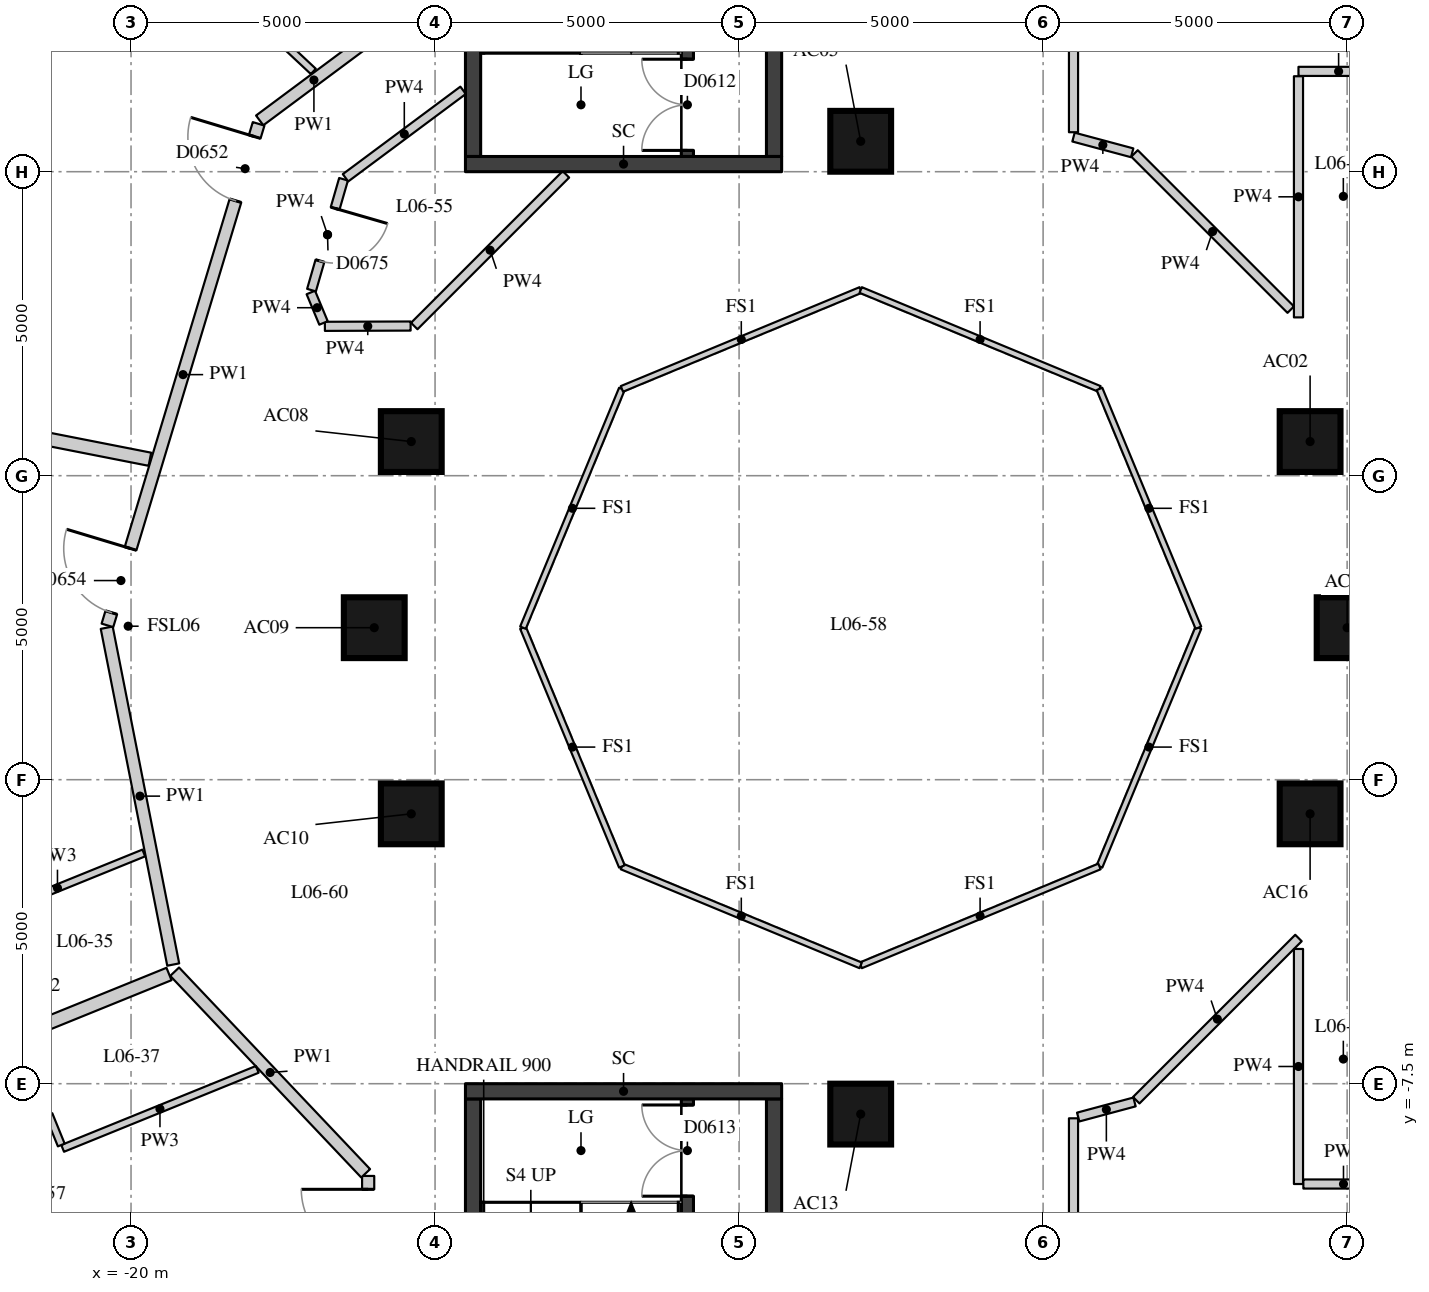
"""IFC4 building model, lengths in metres.
Left out: names, types, materials, properties, quantities, classifications, styles, units other than length and angle.
Written with IfcOpenShell. Run it as: python <this file> out.ifc"""

import sys

from ifc_helpers import new_model, si_unit, direction, frame, frame_2d, origin, origin_2d, place, context, subcontext, project, spatial, rectangle, extrude, element, fill, save


model = new_model("IFC4")
c1 = context("Model", 3, precision=1e-05, world=origin(), true_north=direction((0.0, 1.0)))
c2 = subcontext(c1, "Body", "Model", "MODEL_VIEW")
j1 = project(units=[si_unit("LENGTHUNIT", "METRE"), si_unit("PLANEANGLEUNIT", "RADIAN")], contexts=[c1])
p1 = place(None, origin())
s1 = spatial("IfcSite", under=j1, at=p1, CompositionType="ELEMENT")
p2 = place(p1, origin())
s2 = spatial("IfcBuilding", under=s1, at=p2, CompositionType="ELEMENT")
p3 = place(p2, frame((0.0, 0.0, 28.3)))
s3 = spatial("IfcBuildingStorey", under=s2, at=p3, CompositionType="ELEMENT", Elevation=28.3)
for number, where, z_axis, x_axis in (
    (1, (0.0, 0.0, 0.0), (0.0, 0.0, 1.0), (1.0, 0.0, 0.0)),
    (2, (-0.609, 3.062, 0.0), (0.0, 0.0, 1.0), (1.0, 0.0, 0.0)),
    (3, (-8.0, 8.0, 0.0), (0.0, 0.0, 1.0), (1.0, 0.0, 0.0)),
    (4, (-15.391, 3.062, 0.0), (0.0, 0.0, 1.0), (1.0, 0.0, 0.0)),
    (5, (-16.0, 0.0, 0.0), (0.0, 0.0, 1.0), (1.0, 0.0, 0.0)),
    (6, (-15.391, -3.062, 0.0), (0.0, 0.0, 1.0), (1.0, 0.0, 0.0)),
    (7, (-8.0, -8.0, 0.0), (0.0, 0.0, 1.0), (1.0, 0.0, 0.0)),
    (8, (-0.609, -3.062, 0.0), (0.0, 0.0, 1.0), (1.0, 0.0, 0.0)),
):
    element("IfcColumn", number, at=place(p3, frame(where, z_axis=z_axis, x_axis=x_axis)), inside=s3, PredefinedType="COLUMN", context=c2, shape_type="SweptSolid", body=[
        extrude(rectangle(XDim=1.0, YDim=1.0, at=origin_2d()), origin(), (0.0, 0.0, 1.0), 3.3),
    ])
p4 = place(p3, frame((-10.85, 7.75, 0.0), z_axis=(0.0, 0.0, 1.0), x_axis=(0.0, 1.0, 0.0)))
e9 = element("IfcWall", 9, at=p4, inside=s3, PredefinedType="SHEAR", context=c2, shape_type="SweptSolid", body=[
    extrude(rectangle(XDim=6.0, YDim=0.2, at=frame_2d((3.0, 0.0))), origin(), (0.0, 0.0, 1.0), 3.02),
])
p5 = place(p4, frame((0.1, 0.0, 0.0)))
e10 = element("IfcOpeningElement", 10, at=p5, cuts=e9, PredefinedType="OPENING", context=c2, shape_type="SweptSolid", body=[
    extrude(rectangle(XDim=1.5, YDim=2.1, at=frame_2d((0.75, 1.05))), frame((0.0, 0.11, 0.0), z_axis=(0.0, -1.0, 0.0), x_axis=(1.0, 0.0, 0.0)), (0.0, 0.0, 1.0), 0.22),
])
p6 = place(p3, frame((-10.85, -13.75, 0.0), z_axis=(0.0, 0.0, 1.0), x_axis=(0.0, 1.0, 0.0)))
e11 = element("IfcWall", 11, at=p6, inside=s3, PredefinedType="SHEAR", context=c2, shape_type="SweptSolid", body=[
    extrude(rectangle(XDim=6.0, YDim=0.2, at=frame_2d((3.0, 0.0))), origin(), (0.0, 0.0, 1.0), 3.02),
])
p7 = place(p6, frame((4.4, 0.0, 0.0)))
e12 = element("IfcOpeningElement", 12, at=p7, cuts=e11, PredefinedType="OPENING", context=c2, shape_type="SweptSolid", body=[
    extrude(rectangle(XDim=1.5, YDim=2.1, at=frame_2d((0.75, 1.05))), frame((0.0, 0.11, 0.0), z_axis=(0.0, -1.0, 0.0), x_axis=(1.0, 0.0, 0.0)), (0.0, 0.0, 1.0), 0.22),
])
p8 = place(p3, frame((-14.375, 7.75, -0.28), z_axis=(0.0, 0.0, 1.0), x_axis=(0.0, 1.0, 0.0)))
e13 = element("IfcWall", 13, at=p8, inside=s3, PredefinedType="SHEAR", context=c2, shape_type="SweptSolid", body=[
    extrude(rectangle(XDim=6.0, YDim=0.25, at=frame_2d((3.0, 0.0))), origin(), (0.0, 0.0, 1.0), 3.3),
])
p9 = place(p3, frame((-9.425, 7.75, -0.28), z_axis=(0.0, 0.0, 1.0), x_axis=(0.0, 1.0, 0.0)))
e14 = element("IfcWall", 14, at=p9, inside=s3, PredefinedType="SHEAR", context=c2, shape_type="SweptSolid", body=[
    extrude(rectangle(XDim=6.0, YDim=0.25, at=frame_2d((3.0, 0.0))), origin(), (0.0, 0.0, 1.0), 3.3),
])
p10 = place(p9, frame((2.1, 0.0, 0.28)))
e15 = element("IfcOpeningElement", 15, at=p10, cuts=e14, PredefinedType="OPENING", context=c2, shape_type="SweptSolid", body=[
    extrude(rectangle(XDim=1.5, YDim=2.1, at=frame_2d((0.75, 1.05))), frame((0.0, 0.135, 0.0), z_axis=(0.0, -1.0, 0.0), x_axis=(1.0, 0.0, 0.0)), (0.0, 0.0, 1.0), 0.27),
])
p11 = place(p3, frame((-14.5, 7.625, -0.28), z_axis=(0.0, 0.0, 1.0), x_axis=(1.0, 0.0, 0.0)))
e16 = element("IfcWall", 16, at=p11, inside=s3, PredefinedType="SHEAR", context=c2, shape_type="SweptSolid", body=[
    extrude(rectangle(XDim=5.2, YDim=0.25, at=frame_2d((2.6, 0.0))), origin(), (0.0, 0.0, 1.0), 3.3),
])
p12 = place(p3, frame((-14.375, -13.75, -0.28), z_axis=(0.0, 0.0, 1.0), x_axis=(0.0, 1.0, 0.0)))
e17 = element("IfcWall", 17, at=p12, inside=s3, PredefinedType="SHEAR", context=c2, shape_type="SweptSolid", body=[
    extrude(rectangle(XDim=6.0, YDim=0.25, at=frame_2d((3.0, 0.0))), origin(), (0.0, 0.0, 1.0), 3.3),
])
p13 = place(p3, frame((-9.425, -13.75, -0.28), z_axis=(0.0, 0.0, 1.0), x_axis=(0.0, 1.0, 0.0)))
e18 = element("IfcWall", 18, at=p13, inside=s3, PredefinedType="SHEAR", context=c2, shape_type="SweptSolid", body=[
    extrude(rectangle(XDim=6.0, YDim=0.25, at=frame_2d((3.0, 0.0))), origin(), (0.0, 0.0, 1.0), 3.3),
])
p14 = place(p13, frame((2.4, 0.0, 0.28)))
e19 = element("IfcOpeningElement", 19, at=p14, cuts=e18, PredefinedType="OPENING", context=c2, shape_type="SweptSolid", body=[
    extrude(rectangle(XDim=1.5, YDim=2.1, at=frame_2d((0.75, 1.05))), frame((0.0, 0.135, 0.0), z_axis=(0.0, -1.0, 0.0), x_axis=(1.0, 0.0, 0.0)), (0.0, 0.0, 1.0), 0.27),
])
p15 = place(p3, frame((-14.5, -7.625, -0.28), z_axis=(0.0, 0.0, 1.0), x_axis=(1.0, 0.0, 0.0)))
e20 = element("IfcWall", 20, at=p15, inside=s3, PredefinedType="SHEAR", context=c2, shape_type="SweptSolid", body=[
    extrude(rectangle(XDim=5.2, YDim=0.25, at=frame_2d((2.6, 0.0))), origin(), (0.0, 0.0, 1.0), 3.3),
])
p16 = place(p3, frame((-17.884, 8.344, 0.0), z_axis=(0.0, 0.0, 1.0), x_axis=(0.802260120548, 0.596974621721, 0.0)))
e21 = element("IfcWall", 21, at=p16, inside=s3, PredefinedType="PARTITIONING", context=c2, shape_type="SweptSolid", body=[
    extrude(rectangle(XDim=2.224, YDim=0.2, at=frame_2d((1.112, 0.0))), origin(), (0.0, 0.0, 1.0), 3.02),
])
p17 = place(p3, frame((-16.1, -15.064, 0.0), z_axis=(0.0, 0.0, 1.0), x_axis=(0.0, 1.0, 0.0)))
e22 = element("IfcWall", 22, at=p17, inside=s3, PredefinedType="PARTITIONING", context=c2, shape_type="SweptSolid", body=[
    extrude(rectangle(XDim=6.047, YDim=0.2, at=frame_2d((3.023, 0.0))), origin(), (0.0, 0.0, 1.0), 3.02),
])
p18 = place(p17, frame((4.727, 0.0, 0.0)))
e23 = element("IfcOpeningElement", 23, at=p18, cuts=e22, PredefinedType="OPENING", context=c2, shape_type="SweptSolid", body=[
    extrude(rectangle(XDim=1.1, YDim=2.1, at=frame_2d((0.55, 1.05))), frame((0.0, 0.11, 0.0), z_axis=(0.0, -1.0, 0.0), x_axis=(1.0, 0.0, 0.0)), (0.0, 0.0, 1.0), 0.22),
])
p19 = place(p17, frame((1.467, 0.0, 0.0)))
e24 = element("IfcOpeningElement", 24, at=p19, cuts=e22, PredefinedType="OPENING", context=c2, shape_type="SweptSolid", body=[
    extrude(rectangle(XDim=1.1, YDim=2.1, at=frame_2d((0.55, 1.05))), frame((0.0, 0.11, 0.0), z_axis=(0.0, -1.0, 0.0), x_axis=(1.0, 0.0, 0.0)), (0.0, 0.0, 1.0), 0.22),
])
p20 = place(p3, frame((-16.141, -8.974, 0.0), z_axis=(0.0, 0.0, 1.0), x_axis=(-0.687741683024, 0.725955492735, 0.0)))
e25 = element("IfcWall", 25, at=p20, inside=s3, PredefinedType="PARTITIONING", context=c2, shape_type="SweptSolid", body=[
    extrude(rectangle(XDim=4.568, YDim=0.2, at=frame_2d((2.284, 0.0))), origin(), (0.0, 0.0, 1.0), 3.02),
])
p21 = place(p3, frame((-19.306, -5.541, 0.0), z_axis=(0.0, 0.0, 1.0), x_axis=(-0.193671356151, 0.981066463501, 0.0)))
e26 = element("IfcWall", 26, at=p21, inside=s3, PredefinedType="PARTITIONING", context=c2, shape_type="SweptSolid", body=[
    extrude(rectangle(XDim=5.647, YDim=0.2, at=frame_2d((2.824, 0.0))), origin(), (0.0, 0.0, 1.0), 3.02),
])
p22 = place(p3, frame((-20.388, 0.038, 0.0), z_axis=(0.0, 0.0, 1.0), x_axis=(0.288600779805, 0.957449523419, 0.0)))
e27 = element("IfcWall", 27, at=p22, inside=s3, PredefinedType="PARTITIONING", context=c2, shape_type="SweptSolid", body=[
    extrude(rectangle(XDim=8.615, YDim=0.2, at=frame_2d((4.308, 0.0))), origin(), (0.0, 0.0, 1.0), 3.02),
])
p23 = place(p22, frame((7.295, 0.0, 0.0)))
e28 = element("IfcOpeningElement", 28, at=p23, cuts=e27, PredefinedType="OPENING", context=c2, shape_type="SweptSolid", body=[
    extrude(rectangle(XDim=1.1, YDim=2.1, at=frame_2d((0.55, 1.05))), frame((0.0, 0.11, 0.0), z_axis=(0.0, -1.0, 0.0), x_axis=(1.0, 0.0, 0.0)), (0.0, 0.0, 1.0), 0.22),
])
p24 = place(p22, frame((0.22, 0.0, 0.0)))
e29 = element("IfcOpeningElement", 29, at=p24, cuts=e27, PredefinedType="OPENING", context=c2, shape_type="SweptSolid", body=[
    extrude(rectangle(XDim=1.1, YDim=2.1, at=frame_2d((0.55, 1.05))), frame((0.0, 0.11, 0.0), z_axis=(0.0, -1.0, 0.0), x_axis=(1.0, 0.0, 0.0)), (0.0, 0.0, 1.0), 0.22),
])
p25 = place(p3, frame((0.52, 9.15, 0.0), z_axis=(0.0, 0.0, 1.0), x_axis=(-1.0, 0.0, 0.0)))
e30 = element("IfcWall", 30, at=p25, inside=s3, PredefinedType="PARTITIONING", context=c2, shape_type="SweptSolid", body=[
    extrude(rectangle(XDim=1.32, YDim=0.15, at=frame_2d((0.66, 0.0))), origin(), (0.0, 0.0, 1.0), 3.02),
])
p26 = place(p3, frame((-0.8, 9.07, 0.0), z_axis=(0.0, 0.0, 1.0), x_axis=(0.0, -1.0, 0.0)))
e31 = element("IfcWall", 31, at=p26, inside=s3, PredefinedType="PARTITIONING", context=c2, shape_type="SweptSolid", body=[
    extrude(rectangle(XDim=3.966, YDim=0.15, at=frame_2d((1.983, 0.0))), origin(), (0.0, 0.0, 1.0), 3.02),
])
p27 = place(p3, frame((-0.927, 5.231, 0.0), z_axis=(0.0, 0.0, 1.0), x_axis=(-0.707106781187, 0.707106781187, 0.0)))
e32 = element("IfcWall", 32, at=p27, inside=s3, PredefinedType="PARTITIONING", context=c2, shape_type="SweptSolid", body=[
    extrude(rectangle(XDim=3.633, YDim=0.15, at=frame_2d((1.817, 0.0))), origin(), (0.0, 0.0, 1.0), 3.02),
])
p28 = place(p3, frame((-3.535, 7.811, 0.0), z_axis=(0.0, 0.0, 1.0), x_axis=(-0.965921867197, 0.258833820183, 0.0)))
e33 = element("IfcWall", 33, at=p28, inside=s3, PredefinedType="PARTITIONING", context=c2, shape_type="SweptSolid", body=[
    extrude(rectangle(XDim=0.999, YDim=0.15, at=frame_2d((0.5, 0.0))), origin(), (0.0, 0.0, 1.0), 3.02),
])
p29 = place(p3, frame((-4.5, 8.149, 0.0), z_axis=(0.0, 0.0, 1.0), x_axis=(0.0, 1.0, 0.0)))
e34 = element("IfcWall", 34, at=p29, inside=s3, PredefinedType="PARTITIONING", context=c2, shape_type="SweptSolid", body=[
    extrude(rectangle(XDim=3.601, YDim=0.15, at=frame_2d((1.8, 0.0))), origin(), (0.0, 0.0, 1.0), 3.02),
])
p30 = place(p3, frame((-12.847, 7.456, 0.0), z_axis=(0.0, 0.0, 1.0), x_axis=(-0.707072180997, -0.707141379683, 0.0)))
e35 = element("IfcWall", 35, at=p30, inside=s3, PredefinedType="PARTITIONING", context=c2, shape_type="SweptSolid", body=[
    extrude(rectangle(XDim=3.528, YDim=0.15, at=frame_2d((1.764, 0.0))), origin(), (0.0, 0.0, 1.0), 3.02),
])
p31 = place(p3, frame((-15.402, 4.961, 0.0), z_axis=(0.0, 0.0, 1.0), x_axis=(-0.999994001087, -0.003463782477, 0.0)))
e36 = element("IfcWall", 36, at=p31, inside=s3, PredefinedType="PARTITIONING", context=c2, shape_type="SweptSolid", body=[
    extrude(rectangle(XDim=1.41, YDim=0.15, at=frame_2d((0.705, 0.0))), origin(), (0.0, 0.0, 1.0), 3.02),
])
p32 = place(p3, frame((-16.834, 5.012, 0.0), z_axis=(0.0, 0.0, 1.0), x_axis=(-0.384455737739, 0.923143426408, 0.0)))
e37 = element("IfcWall", 37, at=p32, inside=s3, PredefinedType="PARTITIONING", context=c2, shape_type="SweptSolid", body=[
    extrude(rectangle(XDim=0.543, YDim=0.15, at=frame_2d((0.271, 0.0))), origin(), (0.0, 0.0, 1.0), 3.02),
])
p33 = place(p3, frame((-17.032, 5.552, 0.0), z_axis=(0.0, 0.0, 1.0), x_axis=(0.277658349549, 0.96067988473, 0.0)))
e38 = element("IfcWall", 38, at=p33, inside=s3, PredefinedType="PARTITIONING", context=c2, shape_type="SweptSolid", body=[
    extrude(rectangle(XDim=1.898, YDim=0.15, at=frame_2d((0.949, 0.0))), origin(), (0.0, 0.0, 1.0), 3.02),
])
p34 = place(p33, frame((0.499, 0.0, 0.0)))
e39 = element("IfcOpeningElement", 39, at=p34, cuts=e38, PredefinedType="OPENING", context=c2, shape_type="SweptSolid", body=[
    extrude(rectangle(XDim=0.9, YDim=2.1, at=frame_2d((0.45, 1.05))), frame((0.0, 0.085, 0.0), z_axis=(0.0, -1.0, 0.0), x_axis=(1.0, 0.0, 0.0)), (0.0, 0.0, 1.0), 0.17),
])
p35 = place(p3, frame((-16.473, 7.4, 0.0), z_axis=(0.0, 0.0, 1.0), x_axis=(0.802267063429, 0.596965291233, 0.0)))
e40 = element("IfcWall", 40, at=p35, inside=s3, PredefinedType="PARTITIONING", context=c2, shape_type="SweptSolid", body=[
    extrude(rectangle(XDim=2.41, YDim=0.15, at=frame_2d((1.205, 0.0))), origin(), (0.0, 0.0, 1.0), 3.02),
])
p36 = place(p3, frame((-4.5, -11.67, 0.0), z_axis=(0.0, 0.0, 1.0), x_axis=(0.0, 1.0, 0.0)))
e41 = element("IfcWall", 41, at=p36, inside=s3, PredefinedType="PARTITIONING", context=c2, shape_type="SweptSolid", body=[
    extrude(rectangle(XDim=3.601, YDim=0.15, at=frame_2d((1.8, 0.0))), origin(), (0.0, 0.0, 1.0), 3.02),
])
p37 = place(p3, frame((-4.423, -8.049, 0.0), z_axis=(0.0, 0.0, 1.0), x_axis=(0.96590031435, 0.25891423819, 0.0)))
e42 = element("IfcWall", 42, at=p37, inside=s3, PredefinedType="PARTITIONING", context=c2, shape_type="SweptSolid", body=[
    extrude(rectangle(XDim=0.959, YDim=0.15, at=frame_2d((0.479, 0.0))), origin(), (0.0, 0.0, 1.0), 3.02),
])
p38 = place(p3, frame((-3.468, -7.772, 0.0), z_axis=(0.0, 0.0, 1.0), x_axis=(0.707106781187, 0.707106781187, 0.0)))
e43 = element("IfcWall", 43, at=p38, inside=s3, PredefinedType="PARTITIONING", context=c2, shape_type="SweptSolid", body=[
    extrude(rectangle(XDim=3.773, YDim=0.15, at=frame_2d((1.887, 0.0))), origin(), (0.0, 0.0, 1.0), 3.02),
])
p39 = place(p3, frame((-0.8, -5.284, 0.0), z_axis=(0.0, 0.0, 1.0), x_axis=(0.0, -1.0, 0.0)))
e44 = element("IfcWall", 44, at=p39, inside=s3, PredefinedType="PARTITIONING", context=c2, shape_type="SweptSolid", body=[
    extrude(rectangle(XDim=3.866, YDim=0.15, at=frame_2d((1.933, 0.0))), origin(), (0.0, 0.0, 1.0), 3.02),
])
p40 = place(p3, frame((-0.72, -9.15, 0.0), z_axis=(0.0, 0.0, 1.0), x_axis=(1.0, 0.0, 0.0)))
e45 = element("IfcWall", 45, at=p40, inside=s3, PredefinedType="PARTITIONING", context=c2, shape_type="SweptSolid", body=[
    extrude(rectangle(XDim=1.32, YDim=0.15, at=frame_2d((0.66, 0.0))), origin(), (0.0, 0.0, 1.0), 3.02),
])
p41 = place(p3, frame((-25.761, 3.964, 0.0), z_axis=(0.0, 0.0, 1.0), x_axis=(0.981209888948, -0.192943395406, 0.0)))
e46 = element("IfcWall", 46, at=p41, inside=s3, PredefinedType="PARTITIONING", context=c2, shape_type="SweptSolid", body=[
    extrude(rectangle(XDim=6.188, YDim=0.22, at=frame_2d((3.094, 0.0))), origin(), (0.0, 0.0, 1.0), 2.47),
])
p42 = place(p3, frame((-24.608, -7.82, 0.0), z_axis=(0.0, 0.0, 1.0), x_axis=(0.926565467624, 0.376133532415, 0.0)))
e47 = element("IfcWall", 47, at=p42, inside=s3, PredefinedType="PARTITIONING", context=c2, shape_type="SweptSolid", body=[
    extrude(rectangle(XDim=5.648, YDim=0.22, at=frame_2d((2.824, 0.0))), origin(), (0.0, 0.0, 1.0), 3.02),
])
p43 = place(p3, frame((-17.002, 9.149, 0.0), z_axis=(0.0, 0.0, 1.0), x_axis=(-0.730093035944, 0.683347758368, 0.0)))
e48 = element("IfcWall", 48, at=p43, inside=s3, PredefinedType="PARTITIONING", context=c2, shape_type="SweptSolid", body=[
    extrude(rectangle(XDim=3.437, YDim=0.12, at=frame_2d((1.718, 0.0))), origin(), (0.0, 0.0, 1.0), 3.02),
])
p44 = place(p3, frame((-19.79, -3.705, 0.0), z_axis=(0.0, 0.0, 1.0), x_axis=(-0.926585481443, -0.37608422671, 0.0)))
e49 = element("IfcWall", 49, at=p44, inside=s3, PredefinedType="PARTITIONING", context=c2, shape_type="SweptSolid", body=[
    extrude(rectangle(XDim=3.064, YDim=0.12, at=frame_2d((1.532, 0.0))), origin(), (0.0, 0.0, 1.0), 3.02),
])
p45 = place(p3, frame((-17.924, -7.264, 0.0), z_axis=(0.0, 0.0, 1.0), x_axis=(-0.926548953408, -0.376174210891, 0.0)))
e50 = element("IfcWall", 50, at=p45, inside=s3, PredefinedType="PARTITIONING", context=c2, shape_type="SweptSolid", body=[
    extrude(rectangle(XDim=3.455, YDim=0.12, at=frame_2d((1.727, 0.0))), origin(), (0.0, 0.0, 1.0), 3.02),
])
p46 = place(p3, frame((-21.147, -8.508, 0.0), z_axis=(0.0, 0.0, 1.0), x_axis=(-0.376216010002, 0.92653198208, 0.0)))
e51 = element("IfcWall", 51, at=p46, inside=s3, PredefinedType="PARTITIONING", context=c2, shape_type="SweptSolid", body=[
    extrude(rectangle(XDim=1.83, YDim=0.12, at=frame_2d((0.915, 0.0))), origin(), (0.0, 0.0, 1.0), 3.02),
])
p47 = place(p46, frame((0.54, 0.0, 0.0)))
e52 = element("IfcOpeningElement", 52, at=p47, cuts=e51, PredefinedType="OPENING", context=c2, shape_type="SweptSolid", body=[
    extrude(rectangle(XDim=0.8, YDim=2.1, at=frame_2d((0.4, 1.05))), frame((0.0, 0.07, 0.0), z_axis=(0.0, -1.0, 0.0), x_axis=(1.0, 0.0, 0.0)), (0.0, 0.0, 1.0), 0.14),
])
for number, where, z_axis, x_axis in (
    (53, (-2.446, 0.0, 0.0), (0.0, 0.0, 1.0), (-0.383, -0.924, 0.0)),
    (54, (-4.073, -3.927, 0.0), (0.0, 0.0, 1.0), (-0.924, -0.383, 0.0)),
    (55, (-8.0, -5.554, 0.0), (0.0, 0.0, 1.0), (-0.924, 0.383, 0.0)),
    (56, (-11.927, -3.927, 0.0), (0.0, 0.0, 1.0), (-0.383, 0.924, 0.0)),
    (57, (-13.554, 0.0, 0.0), (0.0, 0.0, 1.0), (0.383, 0.924, 0.0)),
    (58, (-11.927, 3.927, 0.0), (0.0, 0.0, 1.0), (0.924, 0.383, 0.0)),
    (59, (-8.0, 5.554, 0.0), (0.0, 0.0, 1.0), (0.924, -0.383, 0.0)),
    (60, (-4.073, 3.927, 0.0), (0.0, 0.0, 1.0), (0.383, -0.924, 0.0)),
):
    element("IfcWall", number, at=place(p3, frame(where, z_axis=z_axis, x_axis=x_axis)), inside=s3, PredefinedType="PARTITIONING", context=c2, shape_type="SweptSolid", body=[
        extrude(rectangle(XDim=4.251, YDim=0.1, at=frame_2d((2.125, 0.0))), origin(), (0.0, 0.0, 1.0), 3.02),
    ])
p48 = place(p5, origin())
e61 = element("IfcDoor", 61, at=p48, inside=s3, OperationType="DOUBLE_DOOR_SINGLE_SWING", PredefinedType="DOOR", context=c2, shape_type="SweptSolid", body=[
    extrude(rectangle(XDim=1.5, YDim=2.1, at=frame_2d((0.75, 1.05))), frame((0.0, 0.025, 0.0), z_axis=(0.0, -1.0, 0.0), x_axis=(1.0, 0.0, 0.0)), (0.0, 0.0, 1.0), 0.05),
])
fill(e10, e61)
p49 = place(p7, origin())
e62 = element("IfcDoor", 62, at=p49, inside=s3, OperationType="DOUBLE_DOOR_SINGLE_SWING", PredefinedType="DOOR", context=c2, shape_type="SweptSolid", body=[
    extrude(rectangle(XDim=1.5, YDim=2.1, at=frame_2d((0.75, 1.05))), frame((0.0, 0.025, 0.0), z_axis=(0.0, -1.0, 0.0), x_axis=(1.0, 0.0, 0.0)), (0.0, 0.0, 1.0), 0.05),
])
fill(e12, e62)
p50 = place(p23, origin())
e63 = element("IfcDoor", 63, at=p50, inside=s3, OperationType="SINGLE_SWING_RIGHT", PredefinedType="DOOR", context=c2, shape_type="SweptSolid", body=[
    extrude(rectangle(XDim=1.1, YDim=2.1, at=frame_2d((0.55, 1.05))), frame((0.0, 0.025, 0.0), z_axis=(0.0, -1.0, 0.0), x_axis=(1.0, 0.0, 0.0)), (0.0, 0.0, 1.0), 0.05),
])
fill(e28, e63)
p51 = place(p24, origin())
e64 = element("IfcDoor", 64, at=p51, inside=s3, OperationType="SINGLE_SWING_RIGHT", PredefinedType="DOOR", context=c2, shape_type="SweptSolid", body=[
    extrude(rectangle(XDim=1.1, YDim=2.1, at=frame_2d((0.55, 1.05))), frame((0.0, 0.025, 0.0), z_axis=(0.0, -1.0, 0.0), x_axis=(1.0, 0.0, 0.0)), (0.0, 0.0, 1.0), 0.05),
])
fill(e29, e64)
p52 = place(p18, origin())
e65 = element("IfcDoor", 65, at=p52, inside=s3, OperationType="SINGLE_SWING_RIGHT", PredefinedType="DOOR", context=c2, shape_type="SweptSolid", body=[
    extrude(rectangle(XDim=1.1, YDim=2.1, at=frame_2d((0.55, 1.05))), frame((0.0, 0.025, 0.0), z_axis=(0.0, -1.0, 0.0), x_axis=(1.0, 0.0, 0.0)), (0.0, 0.0, 1.0), 0.05),
])
fill(e23, e65)
p53 = place(p34, origin())
e66 = element("IfcDoor", 66, at=p53, inside=s3, OperationType="SINGLE_SWING_LEFT", PredefinedType="DOOR", context=c2, shape_type="SweptSolid", body=[
    extrude(rectangle(XDim=0.9, YDim=2.1, at=frame_2d((0.45, 1.05))), frame((0.0, 0.025, 0.0), z_axis=(0.0, -1.0, 0.0), x_axis=(1.0, 0.0, 0.0)), (0.0, 0.0, 1.0), 0.05),
])
fill(e39, e66)
save(model, sys.argv[1])
